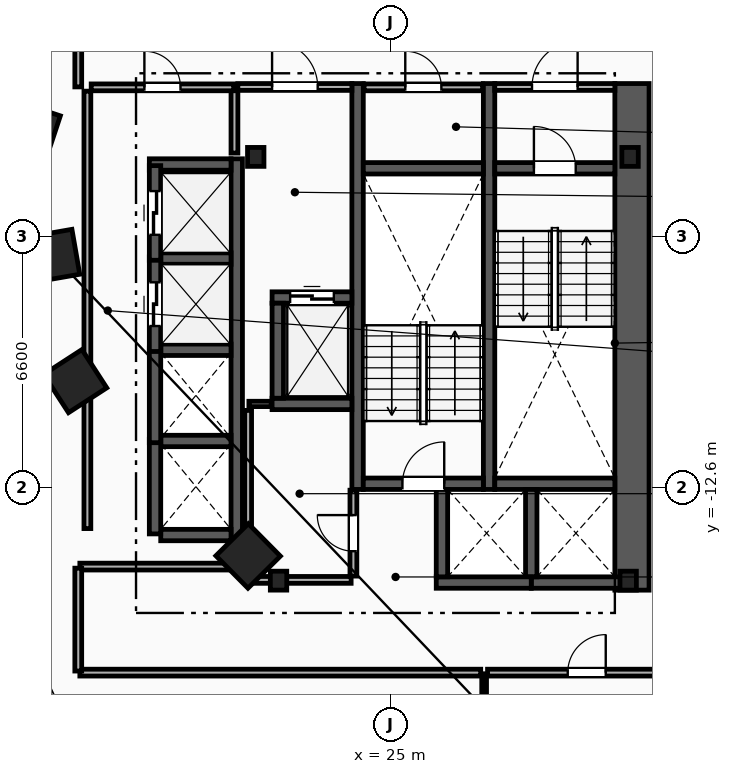
"""IFC4 building model, lengths in metres.
Left out: names, types, materials, properties, quantities, classifications, styles, units other than length and angle.
Written with IfcOpenShell. Run it as: python <this file> out.ifc"""

import sys

from ifc_helpers import new_model, si_unit, direction, frame, frame_2d, origin, origin_2d, place, context, subcontext, project, spatial, rectangle, i_section, extrude, element, fill, save


model = new_model("IFC4")
c1 = context("Model", 3, precision=1e-05, world=origin(), true_north=direction((0.0, 1.0)))
c2 = subcontext(c1, "Body", "Model", "MODEL_VIEW")
j1 = project(units=[si_unit("LENGTHUNIT", "METRE"), si_unit("PLANEANGLEUNIT", "RADIAN")], contexts=[c1])
p1 = place(None, origin())
s1 = spatial("IfcSite", under=j1, at=p1, CompositionType="ELEMENT")
p2 = place(p1, origin())
s2 = spatial("IfcBuilding", under=s1, at=p2, CompositionType="ELEMENT")
p3 = place(p2, frame((0.0, 0.0, 39.2)))
s3 = spatial("IfcBuildingStorey", under=s2, at=p3, CompositionType="ELEMENT", Elevation=39.2)
for number, where, z_axis, x_axis in (
    (1, (31.3, -3.9, 0.0), (0.0, 0.0, 1.0), (1.0, 0.0, 0.0)),
    (2, (21.45, -3.9, 0.0), (0.0, 0.0, 1.0), (1.0, 0.0, 0.0)),
    (3, (22.05, -15.05, 0.0), (0.0, 0.0, 1.0), (1.0, 0.0, 0.0)),
    (4, (31.25, -15.05, 0.0), (0.0, 0.0, 1.0), (1.0, 0.0, 0.0)),
):
    element("IfcColumn", number, at=place(p3, frame(where, z_axis=z_axis, x_axis=x_axis)), inside=s3, PredefinedType="COLUMN", context=c2, shape_type="SweptSolid", body=[
        extrude(i_section(OverallWidth=0.432, OverallDepth=0.498, WebThickness=0.056, FlangeThickness=0.089, FilletRadius=0.018, at=origin_2d()), origin(), (0.0, 0.0, 1.0), 3.8),
    ])
for number, where, z_axis, x_axis in (
    (5, (15.55, -3.2, 0.0), (0.0, 0.0, 1.0), (-0.315, -0.949, 0.0)),
    (6, (16.125, -6.5, 0.0), (0.0, 0.0, 1.0), (0.172, -0.985, 0.0)),
    (7, (16.7, -9.8, 0.0), (0.0, 0.0, 1.0), (0.544, -0.839, 0.0)),
    (8, (21.25, -14.4, 0.0), (0.0, 0.0, 1.0), (0.703, -0.711, 0.0)),
):
    element("IfcColumn", number, at=place(p3, frame(where, z_axis=z_axis, x_axis=x_axis)), inside=s3, PredefinedType="COLUMN", context=c2, shape_type="SweptSolid", body=[
        extrude(rectangle(XDim=1.2, YDim=1.2, at=origin_2d()), origin(), (0.0, 0.0, 1.0), 3.8),
    ])
p4 = place(p3, frame((31.35, -15.3, 0.0), z_axis=(0.0, 0.0, 1.0), x_axis=(0.0, 1.0, 0.0)))
e9 = element("IfcWall", 9, at=p4, inside=s3, PredefinedType="SHEAR", context=c2, shape_type="SweptSolid", body=[
    extrude(rectangle(XDim=13.33, YDim=0.9, at=frame_2d((6.665, 0.0))), origin(), (0.0, 0.0, 1.0), 3.5),
])
for number, where, z_axis, x_axis in (
    (10, (27.59, -12.65, 0.0), (0.0, 0.0, 1.0), (0.0, 1.0, 0.0)),
    (11, (24.13, -12.65, 0.0), (0.0, 0.0, 1.0), (0.0, 1.0, 0.0)),
):
    element("IfcWall", number, at=place(p3, frame(where, z_axis=z_axis, x_axis=x_axis)), inside=s3, PredefinedType="SHEAR", context=c2, shape_type="SweptSolid", body=[
        extrude(rectangle(XDim=10.68, YDim=0.3, at=frame_2d((5.34, 0.0))), origin(), (0.0, 0.0, 1.0), 3.5),
    ])
p5 = place(p3, frame((27.74, -4.2, 0.0), z_axis=(0.0, 0.0, 1.0), x_axis=(1.0, 0.0, 0.0)))
e12 = element("IfcWall", 12, at=p5, inside=s3, PredefinedType="SHEAR", context=c2, shape_type="SweptSolid", body=[
    extrude(rectangle(XDim=3.16, YDim=0.3, at=frame_2d((1.58, 0.0))), origin(), (0.0, 0.0, 1.0), 3.5),
])
p6 = place(p5, frame((1.03, 0.0, 0.0)))
e13 = element("IfcOpeningElement", 13, at=p6, cuts=e12, PredefinedType="OPENING", context=c2, shape_type="SweptSolid", body=[
    extrude(rectangle(XDim=1.1, YDim=2.15, at=frame_2d((0.55, 1.075))), frame((0.0, 0.16, 0.0), z_axis=(0.0, -1.0, 0.0), x_axis=(1.0, 0.0, 0.0)), (0.0, 0.0, 1.0), 0.32),
])
p7 = place(p3, frame((27.74, -12.5, 0.0), z_axis=(0.0, 0.0, 1.0), x_axis=(1.0, 0.0, 0.0)))
e14 = element("IfcWall", 14, at=p7, inside=s3, PredefinedType="SHEAR", context=c2, shape_type="SweptSolid", body=[
    extrude(rectangle(XDim=3.16, YDim=0.3, at=frame_2d((1.58, 0.0))), origin(), (0.0, 0.0, 1.0), 3.5),
])
p8 = place(p3, frame((24.28, -12.5, 0.0), z_axis=(0.0, 0.0, 1.0), x_axis=(1.0, 0.0, 0.0)))
e15 = element("IfcWall", 15, at=p8, inside=s3, PredefinedType="SHEAR", context=c2, shape_type="SweptSolid", body=[
    extrude(rectangle(XDim=3.16, YDim=0.3, at=frame_2d((1.58, 0.0))), origin(), (0.0, 0.0, 1.0), 3.5),
])
p9 = place(p8, frame((1.03, 0.0, 0.0)))
e16 = element("IfcOpeningElement", 16, at=p9, cuts=e15, PredefinedType="OPENING", context=c2, shape_type="SweptSolid", body=[
    extrude(rectangle(XDim=1.1, YDim=2.15, at=frame_2d((0.55, 1.075))), frame((0.0, 0.16, 0.0), z_axis=(0.0, -1.0, 0.0), x_axis=(1.0, 0.0, 0.0)), (0.0, 0.0, 1.0), 0.32),
])
p10 = place(p3, frame((24.28, -4.2, 0.0), z_axis=(0.0, 0.0, 1.0), x_axis=(1.0, 0.0, 0.0)))
e17 = element("IfcWall", 17, at=p10, inside=s3, PredefinedType="SHEAR", context=c2, shape_type="SweptSolid", body=[
    extrude(rectangle(XDim=3.16, YDim=0.3, at=frame_2d((1.58, 0.0))), origin(), (0.0, 0.0, 1.0), 3.5),
])
p11 = place(p3, frame((20.89, -3.8, 0.0), z_axis=(0.0, 0.0, 1.0), x_axis=(0.0, 1.0, 0.0)))
e18 = element("IfcWall", 18, at=p11, inside=s3, PredefinedType="PARTITIONING", context=c2, shape_type="SweptSolid", body=[
    extrude(rectangle(XDim=1.65, YDim=0.18, at=frame_2d((0.825, 0.0))), origin(), (0.0, 0.0, 1.0), 3.5),
])
p12 = place(p3, frame((20.98, -2.06, 0.0), z_axis=(0.0, 0.0, 1.0), x_axis=(1.0, 0.0, 0.0)))
e19 = element("IfcWall", 19, at=p12, inside=s3, PredefinedType="PARTITIONING", context=c2, shape_type="SweptSolid", body=[
    extrude(rectangle(XDim=3.0, YDim=0.18, at=frame_2d((1.5, 0.0))), origin(), (0.0, 0.0, 1.0), 3.5),
])
p13 = place(p12, frame((0.9, 0.0, 0.0)))
e20 = element("IfcOpeningElement", 20, at=p13, cuts=e19, PredefinedType="OPENING", context=c2, shape_type="SweptSolid", body=[
    extrude(rectangle(XDim=1.2, YDim=2.15, at=frame_2d((0.6, 1.075))), frame((0.0, 0.1, 0.0), z_axis=(0.0, -1.0, 0.0), x_axis=(1.0, 0.0, 0.0)), (0.0, 0.0, 1.0), 0.2),
])
p14 = place(p3, frame((27.74, -2.06, 0.0), z_axis=(0.0, 0.0, 1.0), x_axis=(1.0, 0.0, 0.0)))
e21 = element("IfcWall", 21, at=p14, inside=s3, PredefinedType="PARTITIONING", context=c2, shape_type="SweptSolid", body=[
    extrude(rectangle(XDim=3.16, YDim=0.18, at=frame_2d((1.58, 0.0))), origin(), (0.0, 0.0, 1.0), 3.5),
])
p15 = place(p14, frame((0.98, 0.0, 0.0)))
e22 = element("IfcOpeningElement", 22, at=p15, cuts=e21, PredefinedType="OPENING", context=c2, shape_type="SweptSolid", body=[
    extrude(rectangle(XDim=1.2, YDim=2.15, at=frame_2d((0.6, 1.075))), frame((0.0, 0.1, 0.0), z_axis=(0.0, -1.0, 0.0), x_axis=(1.0, 0.0, 0.0)), (0.0, 0.0, 1.0), 0.2),
])
p16 = place(p3, frame((21.88, -7.6, 0.0), z_axis=(0.0, 0.0, 1.0), x_axis=(1.0, 0.0, 0.0)))
e23 = element("IfcWall", 23, at=p16, inside=s3, PredefinedType="SHEAR", context=c2, shape_type="SweptSolid", body=[
    extrude(rectangle(XDim=2.1, YDim=0.3, at=frame_2d((1.05, 0.0))), origin(), (0.0, 0.0, 1.0), 3.5),
])
p17 = place(p16, frame((0.475, 0.0, 0.0)))
e24 = element("IfcOpeningElement", 24, at=p17, cuts=e23, PredefinedType="OPENING", context=c2, shape_type="SweptSolid", body=[
    extrude(rectangle(XDim=1.15, YDim=2.2, at=frame_2d((0.575, 1.1))), frame((0.0, 0.16, 0.0), z_axis=(0.0, -1.0, 0.0), x_axis=(1.0, 0.0, 0.0)), (0.0, 0.0, 1.0), 0.32),
])
p18 = place(p3, frame((21.88, -10.4, 0.0), z_axis=(0.0, 0.0, 1.0), x_axis=(1.0, 0.0, 0.0)))
e25 = element("IfcWall", 25, at=p18, inside=s3, PredefinedType="SHEAR", context=c2, shape_type="SweptSolid", body=[
    extrude(rectangle(XDim=2.1, YDim=0.3, at=frame_2d((1.05, 0.0))), origin(), (0.0, 0.0, 1.0), 3.5),
])
for number, where, z_axis, x_axis in (
    (26, (22.03, -10.25, 0.0), (0.0, 0.0, 1.0), (0.0, 1.0, 0.0)),
    (27, (28.7, -15.1, 0.0), (0.0, 0.0, 1.0), (1.0, 0.0, 0.0)),
):
    element("IfcWall", number, at=place(p3, frame(where, z_axis=z_axis, x_axis=x_axis)), inside=s3, PredefinedType="SHEAR", context=c2, shape_type="SweptSolid", body=[
        extrude(rectangle(XDim=2.5, YDim=0.3, at=frame_2d((1.25, 0.0))), origin(), (0.0, 0.0, 1.0), 3.5),
    ])
p19 = place(p3, frame((28.7, -14.95, 0.0), z_axis=(0.0, 0.0, 1.0), x_axis=(0.0, 1.0, 0.0)))
e28 = element("IfcWall", 28, at=p19, inside=s3, PredefinedType="SHEAR", context=c2, shape_type="SweptSolid", body=[
    extrude(rectangle(XDim=2.3, YDim=0.3, at=frame_2d((1.15, 0.0))), origin(), (0.0, 0.0, 1.0), 3.5),
])
p20 = place(p3, frame((26.2, -15.1, 0.0), z_axis=(0.0, 0.0, 1.0), x_axis=(1.0, 0.0, 0.0)))
e29 = element("IfcWall", 29, at=p20, inside=s3, PredefinedType="SHEAR", context=c2, shape_type="SweptSolid", body=[
    extrude(rectangle(XDim=2.5, YDim=0.3, at=frame_2d((1.25, 0.0))), origin(), (0.0, 0.0, 1.0), 3.5),
])
p21 = place(p3, frame((26.35, -14.95, 0.0), z_axis=(0.0, 0.0, 1.0), x_axis=(0.0, 1.0, 0.0)))
e30 = element("IfcWall", 30, at=p21, inside=s3, PredefinedType="SHEAR", context=c2, shape_type="SweptSolid", body=[
    extrude(rectangle(XDim=2.3, YDim=0.3, at=frame_2d((1.15, 0.0))), origin(), (0.0, 0.0, 1.0), 3.5),
])
p22 = place(p3, frame((20.95, -14.0, 0.0), z_axis=(0.0, 0.0, 1.0), x_axis=(0.0, 1.0, 0.0)))
e31 = element("IfcWall", 31, at=p22, inside=s3, PredefinedType="SHEAR", context=c2, shape_type="SweptSolid", body=[
    extrude(rectangle(XDim=10.05, YDim=0.3, at=frame_2d((5.025, 0.0))), origin(), (0.0, 0.0, 1.0), 3.5),
])
p23 = place(p3, frame((18.95, -13.85, 0.0), z_axis=(0.0, 0.0, 1.0), x_axis=(1.0, 0.0, 0.0)))
e32 = element("IfcWall", 32, at=p23, inside=s3, PredefinedType="SHEAR", context=c2, shape_type="SweptSolid", body=[
    extrude(rectangle(XDim=1.85, YDim=0.3, at=frame_2d((0.925, 0.0))), origin(), (0.0, 0.0, 1.0), 3.5),
])
p24 = place(p3, frame((18.65, -4.1, 0.0), z_axis=(0.0, 0.0, 1.0), x_axis=(1.0, 0.0, 0.0)))
e33 = element("IfcWall", 33, at=p24, inside=s3, PredefinedType="SHEAR", context=c2, shape_type="SweptSolid", body=[
    extrude(rectangle(XDim=2.15, YDim=0.3, at=frame_2d((1.075, 0.0))), origin(), (0.0, 0.0, 1.0), 3.5),
])
for number, where, z_axis, x_axis in (
    (34, (18.95, -11.375, 0.0), (0.0, 0.0, 1.0), (1.0, 0.0, 0.0)),
    (35, (18.95, -8.975, 0.0), (0.0, 0.0, 1.0), (1.0, 0.0, 0.0)),
    (36, (18.95, -6.575, 0.0), (0.0, 0.0, 1.0), (1.0, 0.0, 0.0)),
):
    element("IfcWall", number, at=place(p3, frame(where, z_axis=z_axis, x_axis=x_axis)), inside=s3, PredefinedType="SHEAR", context=c2, shape_type="SweptSolid", body=[
        extrude(rectangle(XDim=1.85, YDim=0.3, at=frame_2d((0.925, 0.0))), origin(), (0.0, 0.0, 1.0), 3.5),
    ])
for number, where, z_axis, x_axis in (
    (37, (18.8, -13.82, 0.0), (0.0, 0.0, 1.0), (0.0, 1.0, 0.0)),
    (38, (18.8, -11.42, 0.0), (0.0, 0.0, 1.0), (0.0, 1.0, 0.0)),
):
    element("IfcWall", number, at=place(p3, frame(where, z_axis=z_axis, x_axis=x_axis)), inside=s3, PredefinedType="SHEAR", context=c2, shape_type="SweptSolid", body=[
        extrude(rectangle(XDim=2.49, YDim=0.3, at=frame_2d((1.245, 0.0))), origin(), (0.0, 0.0, 1.0), 3.5),
    ])
p25 = place(p3, frame((18.8, -9.02, 0.0), z_axis=(0.0, 0.0, 1.0), x_axis=(0.0, 1.0, 0.0)))
e39 = element("IfcWall", 39, at=p25, inside=s3, PredefinedType="SHEAR", context=c2, shape_type="SweptSolid", body=[
    extrude(rectangle(XDim=2.49, YDim=0.3, at=frame_2d((1.245, 0.0))), origin(), (0.0, 0.0, 1.0), 3.5),
])
p26 = place(p25, frame((0.67, 0.0, 0.0)))
e40 = element("IfcOpeningElement", 40, at=p26, cuts=e39, PredefinedType="OPENING", context=c2, shape_type="SweptSolid", body=[
    extrude(rectangle(XDim=1.15, YDim=2.2, at=frame_2d((0.575, 1.1))), frame((0.0, 0.16, 0.0), z_axis=(0.0, -1.0, 0.0), x_axis=(1.0, 0.0, 0.0)), (0.0, 0.0, 1.0), 0.32),
])
p27 = place(p3, frame((18.8, -6.62, 0.0), z_axis=(0.0, 0.0, 1.0), x_axis=(0.0, 1.0, 0.0)))
e41 = element("IfcWall", 41, at=p27, inside=s3, PredefinedType="SHEAR", context=c2, shape_type="SweptSolid", body=[
    extrude(rectangle(XDim=2.49, YDim=0.3, at=frame_2d((1.245, 0.0))), origin(), (0.0, 0.0, 1.0), 3.5),
])
p28 = place(p27, frame((0.67, 0.0, 0.0)))
e42 = element("IfcOpeningElement", 42, at=p28, cuts=e41, PredefinedType="OPENING", context=c2, shape_type="SweptSolid", body=[
    extrude(rectangle(XDim=1.15, YDim=2.2, at=frame_2d((0.575, 1.1))), frame((0.0, 0.16, 0.0), z_axis=(0.0, -1.0, 0.0), x_axis=(1.0, 0.0, 0.0)), (0.0, 0.0, 1.0), 0.32),
])
p29 = place(p3, frame((17.02, -13.68, 0.0), z_axis=(0.0, 0.0, 1.0), x_axis=(0.0, 1.0, 0.0)))
e43 = element("IfcWall", 43, at=p29, inside=s3, PredefinedType="PARTITIONING", context=c2, shape_type="SweptSolid", body=[
    extrude(rectangle(XDim=11.51, YDim=0.18, at=frame_2d((5.755, 0.0))), origin(), (0.0, 0.0, 1.0), 3.5),
])
p30 = place(p3, frame((17.12, -2.07, 0.0), z_axis=(0.0, 0.0, 1.0), x_axis=(1.0, 0.0, 0.0)))
e44 = element("IfcWall", 44, at=p30, inside=s3, PredefinedType="PARTITIONING", context=c2, shape_type="SweptSolid", body=[
    extrude(rectangle(XDim=3.75, YDim=0.18, at=frame_2d((1.875, 0.0))), origin(), (0.0, 0.0, 1.0), 3.5),
])
p31 = place(p30, frame((1.4, 0.0, 0.0)))
e45 = element("IfcOpeningElement", 45, at=p31, cuts=e44, PredefinedType="OPENING", context=c2, shape_type="SweptSolid", body=[
    extrude(rectangle(XDim=0.95, YDim=2.1, at=frame_2d((0.475, 1.05))), frame((0.0, 0.1, 0.0), z_axis=(0.0, -1.0, 0.0), x_axis=(1.0, 0.0, 0.0)), (0.0, 0.0, 1.0), 0.2),
])
p32 = place(p3, frame((21.27, -10.4, 0.0), z_axis=(0.0, 0.0, 1.0), x_axis=(1.0, 0.0, 0.0)))
e46 = element("IfcWall", 46, at=p32, inside=s3, PredefinedType="PARTITIONING", context=c2, shape_type="SweptSolid", body=[
    extrude(rectangle(XDim=0.59, YDim=0.14, at=frame_2d((0.295, 0.0))), origin(), (0.0, 0.0, 1.0), 3.5),
])
p33 = place(p3, frame((21.25, -14.93, 0.0), z_axis=(0.0, 0.0, 1.0), x_axis=(0.0, 1.0, 0.0)))
e47 = element("IfcWall", 47, at=p33, inside=s3, PredefinedType="PARTITIONING", context=c2, shape_type="SweptSolid", body=[
    extrude(rectangle(XDim=4.36, YDim=0.18, at=frame_2d((2.18, 0.0))), origin(), (0.0, 0.0, 1.0), 3.5),
])
p34 = place(p3, frame((21.35, -15.03, 0.0), z_axis=(0.0, 0.0, 1.0), x_axis=(1.0, 0.0, 0.0)))
e48 = element("IfcWall", 48, at=p34, inside=s3, PredefinedType="PARTITIONING", context=c2, shape_type="SweptSolid", body=[
    extrude(rectangle(XDim=2.61, YDim=0.18, at=frame_2d((1.305, 0.0))), origin(), (0.0, 0.0, 1.0), 2.573),
])
p35 = place(p3, frame((24.3, -2.07, 0.0), z_axis=(0.0, 0.0, 1.0), x_axis=(1.0, 0.0, 0.0)))
e49 = element("IfcWall", 49, at=p35, inside=s3, PredefinedType="PARTITIONING", context=c2, shape_type="SweptSolid", body=[
    extrude(rectangle(XDim=3.12, YDim=0.18, at=frame_2d((1.56, 0.0))), origin(), (0.0, 0.0, 1.0), 3.5),
])
p36 = place(p35, frame((1.085, 0.0, 0.0)))
e50 = element("IfcOpeningElement", 50, at=p36, cuts=e49, PredefinedType="OPENING", context=c2, shape_type="SweptSolid", body=[
    extrude(rectangle(XDim=0.95, YDim=2.1, at=frame_2d((0.475, 1.05))), frame((0.0, 0.1, 0.0), z_axis=(0.0, -1.0, 0.0), x_axis=(1.0, 0.0, 0.0)), (0.0, 0.0, 1.0), 0.2),
])
p37 = place(p3, frame((24.02, -14.93, 0.0), z_axis=(0.0, 0.0, 1.0), x_axis=(0.0, 1.0, 0.0)))
e51 = element("IfcWall", 51, at=p37, inside=s3, PredefinedType="PARTITIONING", context=c2, shape_type="SweptSolid", body=[
    extrude(rectangle(XDim=2.26, YDim=0.18, at=frame_2d((1.13, 0.0))), origin(), (0.0, 0.0, 1.0), 3.5),
])
p38 = place(p37, frame((0.655, 0.0, 0.0)))
e52 = element("IfcOpeningElement", 52, at=p38, cuts=e51, PredefinedType="OPENING", context=c2, shape_type="SweptSolid", body=[
    extrude(rectangle(XDim=0.95, YDim=2.1, at=frame_2d((0.475, 1.05))), frame((0.0, 0.1, 0.0), z_axis=(0.0, -1.0, 0.0), x_axis=(1.0, 0.0, 0.0)), (0.0, 0.0, 1.0), 0.2),
])
p39 = place(p3, frame((27.46, -25.521, 0.0), z_axis=(0.0, 0.0, 1.0), x_axis=(0.0, 1.0, 0.0)))
e53 = element("IfcWall", 53, at=p39, inside=s3, PredefinedType="PARTITIONING", context=c2, shape_type="SweptSolid", body=[
    extrude(rectangle(XDim=8.021, YDim=0.125, at=frame_2d((4.01, 0.0))), origin(), (0.0, 0.0, 1.0), 3.5),
])
p40 = place(p3, frame((27.55, -17.47, 0.0), z_axis=(0.0, 0.0, 1.0), x_axis=(1.0, 0.0, 0.0)))
e54 = element("IfcWall", 54, at=p40, inside=s3, PredefinedType="PARTITIONING", context=c2, shape_type="SweptSolid", body=[
    extrude(rectangle(XDim=5.22, YDim=0.18, at=frame_2d((2.61, 0.0))), origin(), (0.0, 0.0, 1.0), 3.5),
])
p41 = place(p40, frame((2.11, 0.0, 0.0)))
e55 = element("IfcOpeningElement", 55, at=p41, cuts=e54, PredefinedType="OPENING", context=c2, shape_type="SweptSolid", body=[
    extrude(rectangle(XDim=1.0, YDim=2.15, at=frame_2d((0.5, 1.075))), frame((0.0, 0.1, 0.0), z_axis=(0.0, -1.0, 0.0), x_axis=(1.0, 0.0, 0.0)), (0.0, 0.0, 1.0), 0.2),
])
p42 = place(p3, frame((16.822, -17.47, 0.0), z_axis=(0.0, 0.0, 1.0), x_axis=(1.0, 0.0, 0.0)))
e56 = element("IfcWall", 56, at=p42, inside=s3, PredefinedType="PARTITIONING", context=c2, shape_type="SweptSolid", body=[
    extrude(rectangle(XDim=10.549, YDim=0.18, at=frame_2d((5.274, 0.0))), origin(), (0.0, 0.0, 1.0), 3.5),
])
p43 = place(p3, frame((21.178, -14.68, 0.0), z_axis=(0.0, 0.0, 1.0), x_axis=(-1.0, 0.0, 0.0)))
e57 = element("IfcWall", 57, at=p43, inside=s3, PredefinedType="PARTITIONING", context=c2, shape_type="SweptSolid", body=[
    extrude(rectangle(XDim=4.357, YDim=0.18, at=frame_2d((2.178, 0.0))), origin(), (0.0, 0.0, 1.0), 3.5),
])
p44 = place(p3, frame((16.78, -14.721, 0.0), z_axis=(0.0, 0.0, 1.0), x_axis=(0.0, -1.0, 0.0)))
e58 = element("IfcWall", 58, at=p44, inside=s3, PredefinedType="PARTITIONING", context=c2, shape_type="SweptSolid", body=[
    extrude(rectangle(XDim=2.707, YDim=0.18, at=frame_2d((1.354, 0.0))), origin(), (0.0, 0.0, 1.0), 3.5),
])
p45 = place(p3, frame((16.78, 0.329, 0.0), z_axis=(0.0, 0.0, 1.0), x_axis=(0.0, -1.0, 0.0)))
e59 = element("IfcWall", 59, at=p45, inside=s3, PredefinedType="PARTITIONING", context=c2, shape_type="SweptSolid", body=[
    extrude(rectangle(XDim=2.387, YDim=0.18, at=frame_2d((1.194, 0.0))), origin(), (0.0, 0.0, 1.0), 3.5),
])
p46 = place(p6, origin())
e60 = element("IfcDoor", 60, at=p46, inside=s3, OperationType="SINGLE_SWING_LEFT", PredefinedType="DOOR", context=c2, shape_type="SweptSolid", body=[
    extrude(rectangle(XDim=1.1, YDim=2.15, at=frame_2d((0.55, 1.075))), frame((0.0, 0.025, 0.0), z_axis=(0.0, -1.0, 0.0), x_axis=(1.0, 0.0, 0.0)), (0.0, 0.0, 1.0), 0.05),
])
fill(e13, e60)
p47 = place(p9, origin())
e61 = element("IfcDoor", 61, at=p47, inside=s3, OperationType="SINGLE_SWING_RIGHT", PredefinedType="DOOR", context=c2, shape_type="SweptSolid", body=[
    extrude(rectangle(XDim=1.1, YDim=2.15, at=frame_2d((0.55, 1.075))), frame((0.0, 0.025, 0.0), z_axis=(0.0, -1.0, 0.0), x_axis=(1.0, 0.0, 0.0)), (0.0, 0.0, 1.0), 0.05),
])
fill(e16, e61)
p48 = place(p13, origin())
e62 = element("IfcDoor", 62, at=p48, inside=s3, OperationType="SINGLE_SWING_LEFT", PredefinedType="DOOR", context=c2, shape_type="SweptSolid", body=[
    extrude(rectangle(XDim=1.2, YDim=2.15, at=frame_2d((0.6, 1.075))), frame((0.0, 0.025, 0.0), z_axis=(0.0, -1.0, 0.0), x_axis=(1.0, 0.0, 0.0)), (0.0, 0.0, 1.0), 0.05),
])
fill(e20, e62)
p49 = place(p15, origin())
e63 = element("IfcDoor", 63, at=p49, inside=s3, OperationType="SINGLE_SWING_RIGHT", PredefinedType="DOOR", context=c2, shape_type="SweptSolid", body=[
    extrude(rectangle(XDim=1.2, YDim=2.15, at=frame_2d((0.6, 1.075))), frame((0.0, 0.025, 0.0), z_axis=(0.0, -1.0, 0.0), x_axis=(1.0, 0.0, 0.0)), (0.0, 0.0, 1.0), 0.05),
])
fill(e22, e63)
p50 = place(p17, origin())
e64 = element("IfcDoor", 64, at=p50, inside=s3, OperationType="SLIDING_TO_LEFT", PredefinedType="TRAPDOOR", context=c2, shape_type="SweptSolid", body=[
    extrude(rectangle(XDim=1.15, YDim=2.2, at=frame_2d((0.575, 1.1))), frame((0.0, 0.025, 0.0), z_axis=(0.0, -1.0, 0.0), x_axis=(1.0, 0.0, 0.0)), (0.0, 0.0, 1.0), 0.05),
])
fill(e24, e64)
p51 = place(p26, origin())
e65 = element("IfcDoor", 65, at=p51, inside=s3, OperationType="SLIDING_TO_LEFT", PredefinedType="TRAPDOOR", context=c2, shape_type="SweptSolid", body=[
    extrude(rectangle(XDim=1.15, YDim=2.2, at=frame_2d((0.575, 1.1))), frame((0.0, 0.025, 0.0), z_axis=(0.0, -1.0, 0.0), x_axis=(1.0, 0.0, 0.0)), (0.0, 0.0, 1.0), 0.05),
])
fill(e40, e65)
p52 = place(p28, origin())
e66 = element("IfcDoor", 66, at=p52, inside=s3, OperationType="SLIDING_TO_LEFT", PredefinedType="TRAPDOOR", context=c2, shape_type="SweptSolid", body=[
    extrude(rectangle(XDim=1.15, YDim=2.2, at=frame_2d((0.575, 1.1))), frame((0.0, 0.025, 0.0), z_axis=(0.0, -1.0, 0.0), x_axis=(1.0, 0.0, 0.0)), (0.0, 0.0, 1.0), 0.05),
])
fill(e42, e66)
p53 = place(p41, origin())
e67 = element("IfcDoor", 67, at=p53, inside=s3, OperationType="SINGLE_SWING_RIGHT", PredefinedType="DOOR", context=c2, shape_type="SweptSolid", body=[
    extrude(rectangle(XDim=1.0, YDim=2.15, at=frame_2d((0.5, 1.075))), frame((0.0, 0.025, 0.0), z_axis=(0.0, -1.0, 0.0), x_axis=(1.0, 0.0, 0.0)), (0.0, 0.0, 1.0), 0.05),
])
fill(e55, e67)
p54 = place(p31, origin())
e68 = element("IfcDoor", 68, at=p54, inside=s3, OperationType="SINGLE_SWING_LEFT", PredefinedType="DOOR", context=c2, shape_type="SweptSolid", body=[
    extrude(rectangle(XDim=0.95, YDim=2.1, at=frame_2d((0.475, 1.05))), frame((0.0, 0.025, 0.0), z_axis=(0.0, -1.0, 0.0), x_axis=(1.0, 0.0, 0.0)), (0.0, 0.0, 1.0), 0.05),
])
fill(e45, e68)
p55 = place(p36, origin())
e69 = element("IfcDoor", 69, at=p55, inside=s3, OperationType="SINGLE_SWING_LEFT", PredefinedType="DOOR", context=c2, shape_type="SweptSolid", body=[
    extrude(rectangle(XDim=0.95, YDim=2.1, at=frame_2d((0.475, 1.05))), frame((0.0, 0.025, 0.0), z_axis=(0.0, -1.0, 0.0), x_axis=(1.0, 0.0, 0.0)), (0.0, 0.0, 1.0), 0.05),
])
fill(e50, e69)
p56 = place(p38, origin())
e70 = element("IfcDoor", 70, at=p56, inside=s3, OperationType="SINGLE_SWING_RIGHT", PredefinedType="DOOR", context=c2, shape_type="SweptSolid", body=[
    extrude(rectangle(XDim=0.95, YDim=2.1, at=frame_2d((0.475, 1.05))), frame((0.0, 0.025, 0.0), z_axis=(0.0, -1.0, 0.0), x_axis=(1.0, 0.0, 0.0)), (0.0, 0.0, 1.0), 0.05),
])
fill(e52, e70)
save(model, sys.argv[1])
